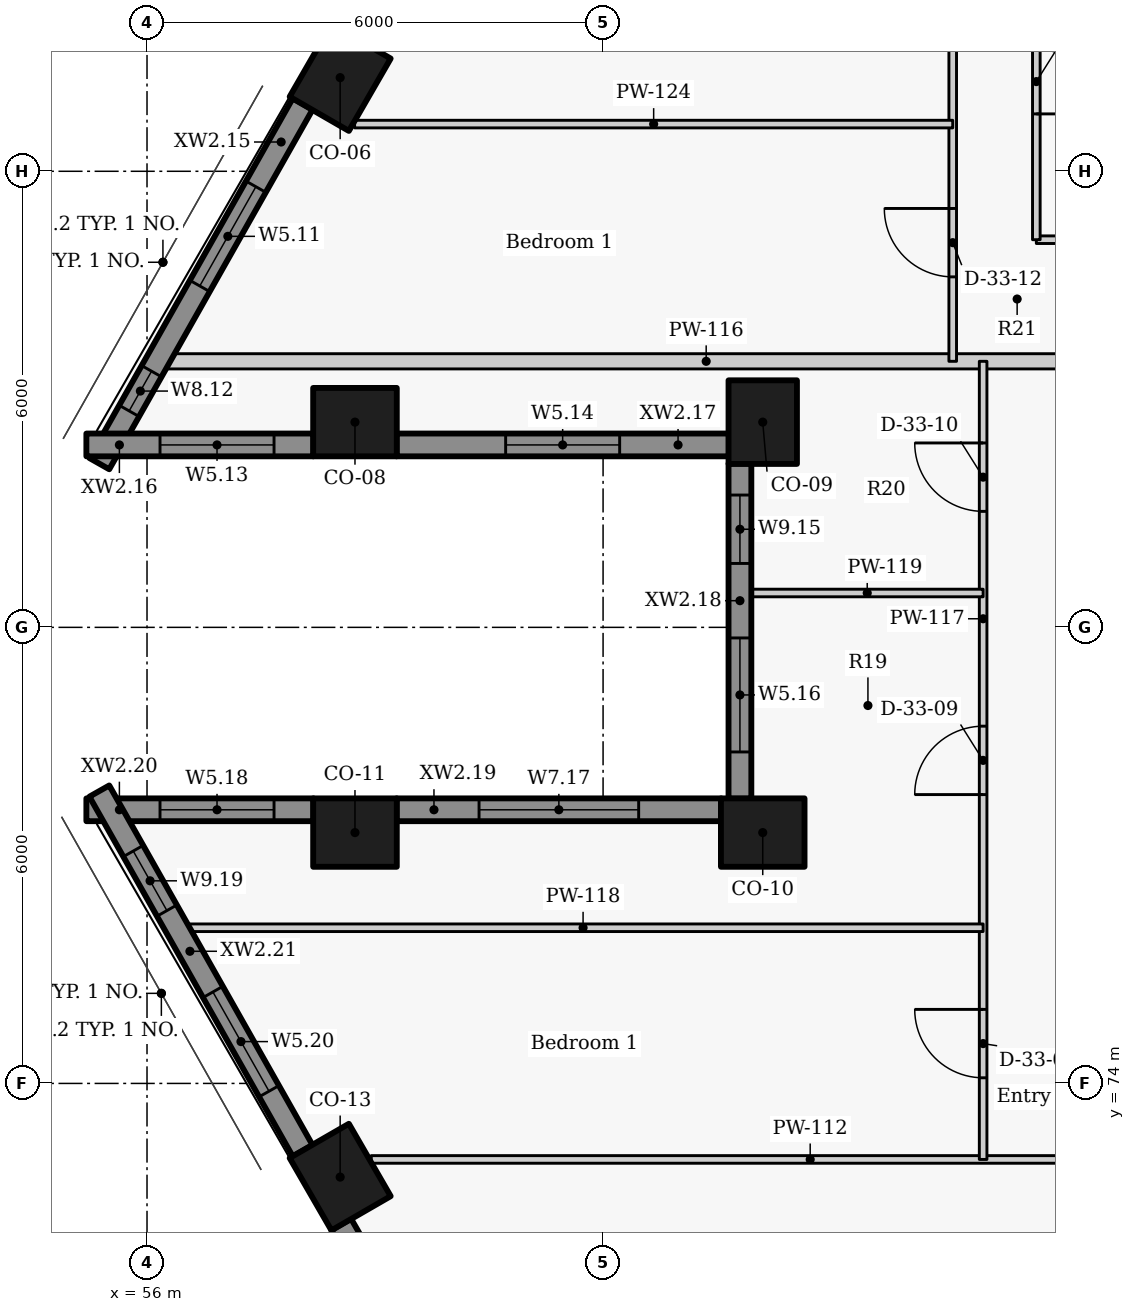
"""IFC4 building model, lengths in metres.
Left out: names, types, materials, properties, quantities, classifications, styles, units other than length and angle.
Written with IfcOpenShell. Run it as: python <this file> out.ifc"""

import sys

from ifc_helpers import new_model, si_unit, direction, frame, frame_2d, origin, origin_2d, place, context, subcontext, project, spatial, rectangle, extrude, element, fill, save


model = new_model("IFC4")
c1 = context("Model", 3, precision=1e-05, world=origin(), true_north=direction((0.0, 1.0)))
c2 = subcontext(c1, "Body", "Model", "MODEL_VIEW")
j1 = project(units=[si_unit("LENGTHUNIT", "METRE"), si_unit("PLANEANGLEUNIT", "RADIAN")], contexts=[c1])
p1 = place(None, origin())
s1 = spatial("IfcSite", under=j1, at=p1, CompositionType="ELEMENT")
p2 = place(p1, origin())
s2 = spatial("IfcBuilding", under=s1, at=p2, CompositionType="ELEMENT")
p3 = place(p2, frame((0.0, 0.0, 259.2)))
s3 = spatial("IfcBuildingStorey", under=s2, at=p3, CompositionType="ELEMENT", Elevation=259.2)
for number, where, z_axis, x_axis in (
    (1, (58.541, 87.232, 0.0), (0.0, 0.0, 1.0), (-0.5, -0.866, 0.0)),
    (2, (58.736, 82.7, 0.0), (0.0, 0.0, 1.0), (1.0, 0.0, 0.0)),
    (3, (64.101, 82.7, 0.0), (0.0, 0.0, 1.0), (0.0, -1.0, 0.0)),
    (4, (64.101, 77.3, 0.0), (0.0, 0.0, 1.0), (-1.0, 0.0, 0.0)),
    (5, (58.736, 77.3, 0.0), (0.0, 0.0, 1.0), (-1.0, 0.0, 0.0)),
    (6, (58.541, 72.768, 0.0), (0.0, 0.0, 1.0), (0.5, -0.866, 0.0)),
):
    element("IfcColumn", number, at=place(p3, frame(where, z_axis=z_axis, x_axis=x_axis)), inside=s3, PredefinedType="COLUMN", context=c2, shape_type="SweptSolid", body=[
        extrude(rectangle(XDim=1.1, YDim=0.9, at=origin_2d()), origin(), (0.0, 0.0, 1.0), 3.3),
    ])
p4 = place(p3, frame((58.048, 86.886, 0.0), z_axis=(0.0, 0.0, 1.0), x_axis=(-0.492080931903, -0.870549456641, 0.0)))
e7 = element("IfcWall", 7, at=p4, inside=s3, PredefinedType="SOLIDWALL", context=c2, shape_type="SweptSolid", body=[
    extrude(rectangle(XDim=5.437, YDim=0.3, at=frame_2d((2.718, 0.0))), origin(), (0.0, 0.0, 1.0), 2.425),
])
p5 = place(p4, frame((1.251, 0.0, 0.9)))
e8 = element("IfcOpeningElement", 8, at=p5, cuts=e7, PredefinedType="OPENING", context=c2, shape_type="SweptSolid", body=[
    extrude(rectangle(XDim=1.5, YDim=1.1, at=frame_2d((0.75, 0.55))), frame((0.0, 0.16, 0.0), z_axis=(0.0, -1.0, 0.0), x_axis=(1.0, 0.0, 0.0)), (0.0, 0.0, 1.0), 0.32),
])
p6 = place(p4, frame((4.04, 0.0, 0.9)))
e9 = element("IfcOpeningElement", 9, at=p6, cuts=e7, PredefinedType="OPENING", context=c2, shape_type="SweptSolid", body=[
    extrude(rectangle(XDim=0.6, YDim=1.1, at=frame_2d((0.3, 0.55))), frame((0.0, 0.16, 0.0), z_axis=(0.0, -1.0, 0.0), x_axis=(1.0, 0.0, 0.0)), (0.0, 0.0, 1.0), 0.32),
])
p7 = place(p3, frame((55.202, 82.4, 0.0), z_axis=(0.0, 0.0, 1.0), x_axis=(1.0, 0.0, 0.0)))
e10 = element("IfcWall", 10, at=p7, inside=s3, PredefinedType="SOLIDWALL", context=c2, shape_type="SweptSolid", body=[
    extrude(rectangle(XDim=2.988, YDim=0.3, at=frame_2d((1.494, 0.0))), origin(), (0.0, 0.0, 1.0), 2.425),
])
p8 = place(p7, frame((0.969, 0.0, 0.9)))
e11 = element("IfcOpeningElement", 11, at=p8, cuts=e10, PredefinedType="OPENING", context=c2, shape_type="SweptSolid", body=[
    extrude(rectangle(XDim=1.5, YDim=1.1, at=frame_2d((0.75, 0.55))), frame((0.0, 0.16, 0.0), z_axis=(0.0, -1.0, 0.0), x_axis=(1.0, 0.0, 0.0)), (0.0, 0.0, 1.0), 0.32),
])
p9 = place(p3, frame((59.282, 82.4, 0.0), z_axis=(0.0, 0.0, 1.0), x_axis=(1.0, 0.0, 0.0)))
e12 = element("IfcWall", 12, at=p9, inside=s3, PredefinedType="SOLIDWALL", context=c2, shape_type="SweptSolid", body=[
    extrude(rectangle(XDim=4.373, YDim=0.3, at=frame_2d((2.186, 0.0))), origin(), (0.0, 0.0, 1.0), 2.425),
])
p10 = place(p9, frame((1.436, 0.0, 0.9)))
e13 = element("IfcOpeningElement", 13, at=p10, cuts=e12, PredefinedType="OPENING", context=c2, shape_type="SweptSolid", body=[
    extrude(rectangle(XDim=1.5, YDim=1.1, at=frame_2d((0.75, 0.55))), frame((0.0, 0.16, 0.0), z_axis=(0.0, -1.0, 0.0), x_axis=(1.0, 0.0, 0.0)), (0.0, 0.0, 1.0), 0.32),
])
p11 = place(p3, frame((63.801, 82.154, 0.0), z_axis=(0.0, 0.0, 1.0), x_axis=(0.0, -1.0, 0.0)))
e14 = element("IfcWall", 14, at=p11, inside=s3, PredefinedType="SOLIDWALL", context=c2, shape_type="SweptSolid", body=[
    extrude(rectangle(XDim=4.408, YDim=0.3, at=frame_2d((2.204, 0.0))), origin(), (0.0, 0.0, 1.0), 2.425),
])
p12 = place(p11, frame((0.413, 0.0, 0.9)))
e15 = element("IfcOpeningElement", 15, at=p12, cuts=e14, PredefinedType="OPENING", context=c2, shape_type="SweptSolid", body=[
    extrude(rectangle(XDim=0.9, YDim=1.1, at=frame_2d((0.45, 0.55))), frame((0.0, 0.16, 0.0), z_axis=(0.0, -1.0, 0.0), x_axis=(1.0, 0.0, 0.0)), (0.0, 0.0, 1.0), 0.32),
])
p13 = place(p11, frame((2.293, 0.0, 0.9)))
e16 = element("IfcOpeningElement", 16, at=p13, cuts=e14, PredefinedType="OPENING", context=c2, shape_type="SweptSolid", body=[
    extrude(rectangle(XDim=1.5, YDim=1.1, at=frame_2d((0.75, 0.55))), frame((0.0, 0.16, 0.0), z_axis=(0.0, -1.0, 0.0), x_axis=(1.0, 0.0, 0.0)), (0.0, 0.0, 1.0), 0.32),
])
p14 = place(p3, frame((63.554, 77.6, 0.0), z_axis=(0.0, 0.0, 1.0), x_axis=(-1.0, 0.0, 0.0)))
e17 = element("IfcWall", 17, at=p14, inside=s3, PredefinedType="SOLIDWALL", context=c2, shape_type="SweptSolid", body=[
    extrude(rectangle(XDim=4.272, YDim=0.3, at=frame_2d((2.136, 0.0))), origin(), (0.0, 0.0, 1.0), 2.425),
])
p15 = place(p14, frame((1.086, 0.0, 0.9)))
e18 = element("IfcOpeningElement", 18, at=p15, cuts=e17, PredefinedType="OPENING", context=c2, shape_type="SweptSolid", body=[
    extrude(rectangle(XDim=2.1, YDim=1.1, at=frame_2d((1.05, 0.55))), frame((0.0, 0.16, 0.0), z_axis=(0.0, -1.0, 0.0), x_axis=(1.0, 0.0, 0.0)), (0.0, 0.0, 1.0), 0.32),
])
p16 = place(p3, frame((58.19, 77.6, 0.0), z_axis=(0.0, 0.0, 1.0), x_axis=(-1.0, 0.0, 0.0)))
e19 = element("IfcWall", 19, at=p16, inside=s3, PredefinedType="SOLIDWALL", context=c2, shape_type="SweptSolid", body=[
    extrude(rectangle(XDim=2.988, YDim=0.3, at=frame_2d((1.494, 0.0))), origin(), (0.0, 0.0, 1.0), 2.425),
])
p17 = place(p16, frame((0.519, 0.0, 0.9)))
e20 = element("IfcOpeningElement", 20, at=p17, cuts=e19, PredefinedType="OPENING", context=c2, shape_type="SweptSolid", body=[
    extrude(rectangle(XDim=1.5, YDim=1.1, at=frame_2d((0.75, 0.55))), frame((0.0, 0.16, 0.0), z_axis=(0.0, -1.0, 0.0), x_axis=(1.0, 0.0, 0.0)), (0.0, 0.0, 1.0), 0.32),
])
p18 = place(p3, frame((55.373, 77.846, 0.0), z_axis=(0.0, 0.0, 1.0), x_axis=(0.492080931903, -0.870549456641, 0.0)))
e21 = element("IfcWall", 21, at=p18, inside=s3, PredefinedType="SOLIDWALL", context=c2, shape_type="SweptSolid", body=[
    extrude(rectangle(XDim=5.437, YDim=0.3, at=frame_2d((2.718, 0.0))), origin(), (0.0, 0.0, 1.0), 2.425),
])
p19 = place(p18, frame((0.906, 0.0, 0.9)))
e22 = element("IfcOpeningElement", 22, at=p19, cuts=e21, PredefinedType="OPENING", context=c2, shape_type="SweptSolid", body=[
    extrude(rectangle(XDim=0.9, YDim=1.1, at=frame_2d((0.45, 0.55))), frame((0.0, 0.16, 0.0), z_axis=(0.0, -1.0, 0.0), x_axis=(1.0, 0.0, 0.0)), (0.0, 0.0, 1.0), 0.32),
])
p20 = place(p18, frame((3.036, 0.0, 0.9)))
e23 = element("IfcOpeningElement", 23, at=p20, cuts=e21, PredefinedType="OPENING", context=c2, shape_type="SweptSolid", body=[
    extrude(rectangle(XDim=1.5, YDim=1.1, at=frame_2d((0.75, 0.55))), frame((0.0, 0.16, 0.0), z_axis=(0.0, -1.0, 0.0), x_axis=(1.0, 0.0, 0.0)), (0.0, 0.0, 1.0), 0.32),
])
p21 = place(p3, frame((58.554, 72.145, 0.0), z_axis=(0.0, 0.0, 1.0), x_axis=(0.500010404316, -0.866019396766, 0.0)))
e24 = element("IfcWall", 24, at=p21, inside=s3, PredefinedType="SOLIDWALL", context=c2, shape_type="SweptSolid", body=[
    extrude(rectangle(XDim=3.547, YDim=0.3, at=frame_2d((1.774, 0.0))), origin(), (0.0, 0.0, 1.0), 2.425),
])
p22 = place(p21, frame((0.723, 0.0, 0.9)))
e25 = element("IfcOpeningElement", 25, at=p22, cuts=e24, PredefinedType="OPENING", context=c2, shape_type="SweptSolid", body=[
    extrude(rectangle(XDim=2.1, YDim=1.1, at=frame_2d((1.05, 0.55))), frame((0.0, 0.16, 0.0), z_axis=(0.0, -1.0, 0.0), x_axis=(1.0, 0.0, 0.0)), (0.0, 0.0, 1.0), 0.32),
])
p23 = place(p3, frame((58.95, 73.0, 0.0), z_axis=(0.0, 0.0, 1.0), x_axis=(1.0, 0.0, 0.0)))
e26 = element("IfcWall", 26, at=p23, inside=s3, PredefinedType="PARTITIONING", context=c2, shape_type="SweptSolid", body=[
    extrude(rectangle(XDim=11.55, YDim=0.1, at=frame_2d((5.775, 0.0))), origin(), (0.0, 0.0, 1.0), 2.505),
])
p24 = place(p3, frame((56.213, 83.5, 0.0), z_axis=(0.0, 0.0, 1.0), x_axis=(1.0, 0.0, 0.0)))
e27 = element("IfcWall", 27, at=p24, inside=s3, PredefinedType="PARTITIONING", context=c2, shape_type="SweptSolid", body=[
    extrude(rectangle(XDim=14.287, YDim=0.2, at=frame_2d((7.144, 0.0))), origin(), (0.0, 0.0, 1.0), 2.405),
])
p25 = place(p3, frame((67.0, 73.0, 0.0), z_axis=(0.0, 0.0, 1.0), x_axis=(0.0, 1.0, 0.0)))
e28 = element("IfcWall", 28, at=p25, inside=s3, PredefinedType="PARTITIONING", context=c2, shape_type="SweptSolid", body=[
    extrude(rectangle(XDim=10.5, YDim=0.1, at=frame_2d((5.25, 0.0))), origin(), (0.0, 0.0, 1.0), 3.025),
])
p26 = place(p25, frame((1.074, 0.0, 0.0)))
e29 = element("IfcOpeningElement", 29, at=p26, cuts=e28, PredefinedType="OPENING", context=c2, shape_type="SweptSolid", body=[
    extrude(rectangle(XDim=0.9, YDim=2.1, at=frame_2d((0.45, 1.05))), frame((0.0, 0.06, 0.0), z_axis=(0.0, -1.0, 0.0), x_axis=(1.0, 0.0, 0.0)), (0.0, 0.0, 1.0), 0.12),
])
p27 = place(p25, frame((4.8, 0.0, 0.0)))
e30 = element("IfcOpeningElement", 30, at=p27, cuts=e28, PredefinedType="OPENING", context=c2, shape_type="SweptSolid", body=[
    extrude(rectangle(XDim=0.9, YDim=2.1, at=frame_2d((0.45, 1.05))), frame((0.0, 0.06, 0.0), z_axis=(0.0, -1.0, 0.0), x_axis=(1.0, 0.0, 0.0)), (0.0, 0.0, 1.0), 0.12),
])
p28 = place(p25, frame((8.526, 0.0, 0.0)))
e31 = element("IfcOpeningElement", 31, at=p28, cuts=e28, PredefinedType="OPENING", context=c2, shape_type="SweptSolid", body=[
    extrude(rectangle(XDim=0.9, YDim=2.1, at=frame_2d((0.45, 1.05))), frame((0.0, 0.06, 0.0), z_axis=(0.0, -1.0, 0.0), x_axis=(1.0, 0.0, 0.0)), (0.0, 0.0, 1.0), 0.12),
])
p29 = place(p3, frame((56.474, 76.048, 0.0), z_axis=(0.0, 0.0, 1.0), x_axis=(1.0, 0.0, 0.0)))
e32 = element("IfcWall", 32, at=p29, inside=s3, PredefinedType="PARTITIONING", context=c2, shape_type="SweptSolid", body=[
    extrude(rectangle(XDim=10.526, YDim=0.1, at=frame_2d((5.263, 0.0))), origin(), (0.0, 0.0, 1.0), 2.405),
])
p30 = place(p3, frame((63.95, 80.452, 0.0), z_axis=(0.0, 0.0, 1.0), x_axis=(1.0, 0.0, 0.0)))
e33 = element("IfcWall", 33, at=p30, inside=s3, PredefinedType="PARTITIONING", context=c2, shape_type="SweptSolid", body=[
    extrude(rectangle(XDim=3.05, YDim=0.1, at=frame_2d((1.525, 0.0))), origin(), (0.0, 0.0, 1.0), 2.405),
])
p31 = place(p3, frame((67.7, 85.1, 0.0), z_axis=(0.0, 0.0, 1.0), x_axis=(1.0, 0.0, 0.0)))
e34 = element("IfcWall", 34, at=p31, inside=s3, PredefinedType="PARTITIONING", context=c2, shape_type="SweptSolid", body=[
    extrude(rectangle(XDim=2.8, YDim=0.1, at=frame_2d((1.4, 0.0))), origin(), (0.0, 0.0, 1.0), 2.505),
])
p32 = place(p3, frame((67.7, 94.25, 0.0), z_axis=(0.0, 0.0, 1.0), x_axis=(0.0, -1.0, 0.0)))
e35 = element("IfcWall", 35, at=p32, inside=s3, PredefinedType="PARTITIONING", context=c2, shape_type="SweptSolid", body=[
    extrude(rectangle(XDim=9.15, YDim=0.1, at=frame_2d((4.575, 0.0))), origin(), (0.0, 0.0, 1.0), 3.025),
])
p33 = place(p32, frame((6.645, 0.0, 0.0)))
e36 = element("IfcOpeningElement", 36, at=p33, cuts=e35, PredefinedType="OPENING", context=c2, shape_type="SweptSolid", body=[
    extrude(rectangle(XDim=0.85, YDim=2.1, at=frame_2d((0.425, 1.05))), frame((0.0, 0.06, 0.0), z_axis=(0.0, -1.0, 0.0), x_axis=(1.0, 0.0, 0.0)), (0.0, 0.0, 1.0), 0.12),
])
p34 = place(p32, frame((2.045, 0.0, 0.0)))
e37 = element("IfcOpeningElement", 37, at=p34, cuts=e35, PredefinedType="OPENING", context=c2, shape_type="SweptSolid", body=[
    extrude(rectangle(XDim=0.9, YDim=2.1, at=frame_2d((0.45, 1.05))), frame((0.0, 0.06, 0.0), z_axis=(0.0, -1.0, 0.0), x_axis=(1.0, 0.0, 0.0)), (0.0, 0.0, 1.0), 0.12),
])
p35 = place(p3, frame((66.6, 83.5, 0.0), z_axis=(0.0, 0.0, 1.0), x_axis=(0.0, 1.0, 0.0)))
e38 = element("IfcWall", 38, at=p35, inside=s3, PredefinedType="PARTITIONING", context=c2, shape_type="SweptSolid", body=[
    extrude(rectangle(XDim=10.75, YDim=0.1, at=frame_2d((5.375, 0.0))), origin(), (0.0, 0.0, 1.0), 3.025),
])
p36 = place(p35, frame((1.111, 0.0, 0.0)))
e39 = element("IfcOpeningElement", 39, at=p36, cuts=e38, PredefinedType="OPENING", context=c2, shape_type="SweptSolid", body=[
    extrude(rectangle(XDim=0.9, YDim=2.1, at=frame_2d((0.45, 1.05))), frame((0.0, 0.06, 0.0), z_axis=(0.0, -1.0, 0.0), x_axis=(1.0, 0.0, 0.0)), (0.0, 0.0, 1.0), 0.12),
])
p37 = place(p35, frame((4.925, 0.0, 0.0)))
e40 = element("IfcOpeningElement", 40, at=p37, cuts=e38, PredefinedType="OPENING", context=c2, shape_type="SweptSolid", body=[
    extrude(rectangle(XDim=0.9, YDim=2.1, at=frame_2d((0.45, 1.05))), frame((0.0, 0.06, 0.0), z_axis=(0.0, -1.0, 0.0), x_axis=(1.0, 0.0, 0.0)), (0.0, 0.0, 1.0), 0.12),
])
p38 = place(p35, frame((8.74, 0.0, 0.0)))
e41 = element("IfcOpeningElement", 41, at=p38, cuts=e38, PredefinedType="OPENING", context=c2, shape_type="SweptSolid", body=[
    extrude(rectangle(XDim=0.9, YDim=2.1, at=frame_2d((0.45, 1.05))), frame((0.0, 0.06, 0.0), z_axis=(0.0, -1.0, 0.0), x_axis=(1.0, 0.0, 0.0)), (0.0, 0.0, 1.0), 0.12),
])
p39 = place(p3, frame((58.731, 86.621, 0.0), z_axis=(0.0, 0.0, 1.0), x_axis=(1.0, 0.0, 0.0)))
e42 = element("IfcWall", 42, at=p39, inside=s3, PredefinedType="PARTITIONING", context=c2, shape_type="SweptSolid", body=[
    extrude(rectangle(XDim=7.869, YDim=0.1, at=frame_2d((3.935, 0.0))), origin(), (0.0, 0.0, 1.0), 3.025),
])
p40 = place(p5, origin())
e43 = element("IfcWindow", 43, at=p40, inside=s3, PartitioningType="SINGLE_PANEL", PredefinedType="WINDOW", context=c2, shape_type="SweptSolid", body=[
    extrude(rectangle(XDim=1.5, YDim=1.1, at=frame_2d((0.75, 0.55))), frame((0.0, 0.03, 0.0), z_axis=(0.0, -1.0, 0.0), x_axis=(1.0, 0.0, 0.0)), (0.0, 0.0, 1.0), 0.06),
])
fill(e8, e43)
p41 = place(p6, origin())
e44 = element("IfcWindow", 44, at=p41, inside=s3, PartitioningType="SINGLE_PANEL", PredefinedType="WINDOW", context=c2, shape_type="SweptSolid", body=[
    extrude(rectangle(XDim=0.6, YDim=1.1, at=frame_2d((0.3, 0.55))), frame((0.0, 0.03, 0.0), z_axis=(0.0, -1.0, 0.0), x_axis=(1.0, 0.0, 0.0)), (0.0, 0.0, 1.0), 0.06),
])
fill(e9, e44)
p42 = place(p8, origin())
e45 = element("IfcWindow", 45, at=p42, inside=s3, PartitioningType="SINGLE_PANEL", PredefinedType="WINDOW", context=c2, shape_type="SweptSolid", body=[
    extrude(rectangle(XDim=1.5, YDim=1.1, at=frame_2d((0.75, 0.55))), frame((0.0, 0.03, 0.0), z_axis=(0.0, -1.0, 0.0), x_axis=(1.0, 0.0, 0.0)), (0.0, 0.0, 1.0), 0.06),
])
fill(e11, e45)
p43 = place(p10, origin())
e46 = element("IfcWindow", 46, at=p43, inside=s3, PartitioningType="SINGLE_PANEL", PredefinedType="WINDOW", context=c2, shape_type="SweptSolid", body=[
    extrude(rectangle(XDim=1.5, YDim=1.1, at=frame_2d((0.75, 0.55))), frame((0.0, 0.03, 0.0), z_axis=(0.0, -1.0, 0.0), x_axis=(1.0, 0.0, 0.0)), (0.0, 0.0, 1.0), 0.06),
])
fill(e13, e46)
p44 = place(p12, origin())
e47 = element("IfcWindow", 47, at=p44, inside=s3, PartitioningType="SINGLE_PANEL", PredefinedType="WINDOW", context=c2, shape_type="SweptSolid", body=[
    extrude(rectangle(XDim=0.9, YDim=1.1, at=frame_2d((0.45, 0.55))), frame((0.0, 0.03, 0.0), z_axis=(0.0, -1.0, 0.0), x_axis=(1.0, 0.0, 0.0)), (0.0, 0.0, 1.0), 0.06),
])
fill(e15, e47)
p45 = place(p13, origin())
e48 = element("IfcWindow", 48, at=p45, inside=s3, PartitioningType="SINGLE_PANEL", PredefinedType="WINDOW", context=c2, shape_type="SweptSolid", body=[
    extrude(rectangle(XDim=1.5, YDim=1.1, at=frame_2d((0.75, 0.55))), frame((0.0, 0.03, 0.0), z_axis=(0.0, -1.0, 0.0), x_axis=(1.0, 0.0, 0.0)), (0.0, 0.0, 1.0), 0.06),
])
fill(e16, e48)
p46 = place(p15, origin())
e49 = element("IfcWindow", 49, at=p46, inside=s3, PartitioningType="SINGLE_PANEL", PredefinedType="WINDOW", context=c2, shape_type="SweptSolid", body=[
    extrude(rectangle(XDim=2.1, YDim=1.1, at=frame_2d((1.05, 0.55))), frame((0.0, 0.03, 0.0), z_axis=(0.0, -1.0, 0.0), x_axis=(1.0, 0.0, 0.0)), (0.0, 0.0, 1.0), 0.06),
])
fill(e18, e49)
p47 = place(p17, origin())
e50 = element("IfcWindow", 50, at=p47, inside=s3, PartitioningType="SINGLE_PANEL", PredefinedType="WINDOW", context=c2, shape_type="SweptSolid", body=[
    extrude(rectangle(XDim=1.5, YDim=1.1, at=frame_2d((0.75, 0.55))), frame((0.0, 0.03, 0.0), z_axis=(0.0, -1.0, 0.0), x_axis=(1.0, 0.0, 0.0)), (0.0, 0.0, 1.0), 0.06),
])
fill(e20, e50)
p48 = place(p19, origin())
e51 = element("IfcWindow", 51, at=p48, inside=s3, PartitioningType="SINGLE_PANEL", PredefinedType="WINDOW", context=c2, shape_type="SweptSolid", body=[
    extrude(rectangle(XDim=0.9, YDim=1.1, at=frame_2d((0.45, 0.55))), frame((0.0, 0.03, 0.0), z_axis=(0.0, -1.0, 0.0), x_axis=(1.0, 0.0, 0.0)), (0.0, 0.0, 1.0), 0.06),
])
fill(e22, e51)
p49 = place(p20, origin())
e52 = element("IfcWindow", 52, at=p49, inside=s3, PartitioningType="SINGLE_PANEL", PredefinedType="WINDOW", context=c2, shape_type="SweptSolid", body=[
    extrude(rectangle(XDim=1.5, YDim=1.1, at=frame_2d((0.75, 0.55))), frame((0.0, 0.03, 0.0), z_axis=(0.0, -1.0, 0.0), x_axis=(1.0, 0.0, 0.0)), (0.0, 0.0, 1.0), 0.06),
])
fill(e23, e52)
p50 = place(p26, origin())
e53 = element("IfcDoor", 53, at=p50, inside=s3, OperationType="SINGLE_SWING_RIGHT", PredefinedType="DOOR", context=c2, shape_type="SweptSolid", body=[
    extrude(rectangle(XDim=0.9, YDim=2.1, at=frame_2d((0.45, 1.05))), frame((0.0, 0.025, 0.0), z_axis=(0.0, -1.0, 0.0), x_axis=(1.0, 0.0, 0.0)), (0.0, 0.0, 1.0), 0.05),
])
fill(e29, e53)
p51 = place(p27, origin())
e54 = element("IfcDoor", 54, at=p51, inside=s3, OperationType="SINGLE_SWING_LEFT", PredefinedType="DOOR", context=c2, shape_type="SweptSolid", body=[
    extrude(rectangle(XDim=0.9, YDim=2.1, at=frame_2d((0.45, 1.05))), frame((0.0, 0.025, 0.0), z_axis=(0.0, -1.0, 0.0), x_axis=(1.0, 0.0, 0.0)), (0.0, 0.0, 1.0), 0.05),
])
fill(e30, e54)
p52 = place(p28, origin())
e55 = element("IfcDoor", 55, at=p52, inside=s3, OperationType="SINGLE_SWING_RIGHT", PredefinedType="DOOR", context=c2, shape_type="SweptSolid", body=[
    extrude(rectangle(XDim=0.9, YDim=2.1, at=frame_2d((0.45, 1.05))), frame((0.0, 0.025, 0.0), z_axis=(0.0, -1.0, 0.0), x_axis=(1.0, 0.0, 0.0)), (0.0, 0.0, 1.0), 0.05),
])
fill(e31, e55)
p53 = place(p33, origin())
e56 = element("IfcDoor", 56, at=p53, inside=s3, OperationType="SINGLE_SWING_RIGHT", PredefinedType="DOOR", context=c2, shape_type="SweptSolid", body=[
    extrude(rectangle(XDim=0.85, YDim=2.1, at=frame_2d((0.425, 1.05))), frame((0.0, 0.025, 0.0), z_axis=(0.0, -1.0, 0.0), x_axis=(1.0, 0.0, 0.0)), (0.0, 0.0, 1.0), 0.05),
])
fill(e36, e56)
p54 = place(p36, origin())
e57 = element("IfcDoor", 57, at=p54, inside=s3, OperationType="SINGLE_SWING_RIGHT", PredefinedType="DOOR", context=c2, shape_type="SweptSolid", body=[
    extrude(rectangle(XDim=0.9, YDim=2.1, at=frame_2d((0.45, 1.05))), frame((0.0, 0.025, 0.0), z_axis=(0.0, -1.0, 0.0), x_axis=(1.0, 0.0, 0.0)), (0.0, 0.0, 1.0), 0.05),
])
fill(e39, e57)
save(model, sys.argv[1])
